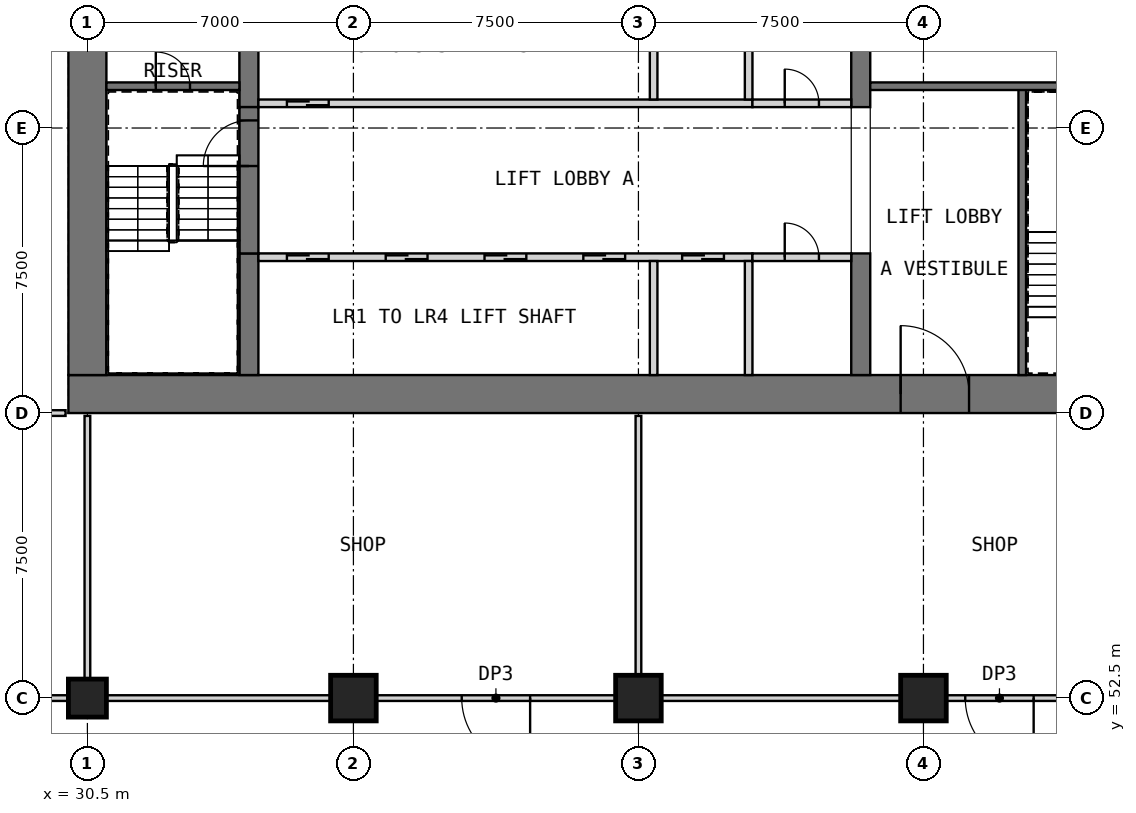
"""IFC4 building model, lengths in metres.
Left out: names, types, materials, properties, quantities, classifications, styles, units other than length and angle.
Written with IfcOpenShell. Run it as: python <this file> out.ifc"""

import sys

from ifc_helpers import new_model, si_unit, direction, frame, frame_2d, origin, origin_2d, place, context, subcontext, project, spatial, rectangle, extrude, element, fill, save


model = new_model("IFC4")
c1 = context("Model", 3, precision=1e-05, world=origin(), true_north=direction((0.0, 1.0)))
c2 = subcontext(c1, "Body", "Model", "MODEL_VIEW")
j1 = project(units=[si_unit("LENGTHUNIT", "METRE"), si_unit("PLANEANGLEUNIT", "RADIAN")], contexts=[c1])
p1 = place(None, origin())
s1 = spatial("IfcSite", under=j1, at=p1, CompositionType="ELEMENT")
p2 = place(p1, origin())
s2 = spatial("IfcBuilding", under=s1, at=p2, CompositionType="ELEMENT")
p3 = place(p2, frame((0.0, 0.0, 13.5)))
s3 = spatial("IfcBuildingStorey", under=s2, at=p3, CompositionType="ELEMENT", Elevation=13.5)
p4 = place(p3, frame((30.5, 52.5, 0.0), z_axis=(0.0, 0.0, 1.0), x_axis=(1.0, 0.0, 0.0)))
e1 = element("IfcColumn", 1, at=p4, inside=s3, PredefinedType="COLUMN", context=c2, shape_type="SweptSolid", body=[
    extrude(rectangle(XDim=1.0, YDim=1.0, at=origin_2d()), origin(), (0.0, 0.0, 1.0), 5.0),
])
for number, where, z_axis, x_axis in (
    (2, (37.5, 52.5, 0.0), (0.0, 0.0, 1.0), (1.0, 0.0, 0.0)),
    (3, (45.0, 52.5, 0.0), (0.0, 0.0, 1.0), (1.0, 0.0, 0.0)),
    (4, (52.5, 52.5, 0.0), (0.0, 0.0, 1.0), (1.0, 0.0, 0.0)),
):
    element("IfcColumn", number, at=place(p3, frame(where, z_axis=z_axis, x_axis=x_axis)), inside=s3, PredefinedType="COLUMN", context=c2, shape_type="SweptSolid", body=[
        extrude(rectangle(XDim=1.2, YDim=1.2, at=origin_2d()), origin(), (0.0, 0.0, 1.0), 5.0),
    ])
p5 = place(p3, frame((30.0, 60.5, 0.0), z_axis=(0.0, 0.0, 1.0), x_axis=(1.0, 0.0, 0.0)))
e5 = element("IfcWall", 5, at=p5, inside=s3, PredefinedType="SHEAR", context=c2, shape_type="SweptSolid", body=[
    extrude(rectangle(XDim=30.0, YDim=1.0, at=frame_2d((15.0, 0.0))), origin(), (0.0, 0.0, 1.0), 5.0),
])
p6 = place(p5, frame((21.9, 0.0, 0.0)))
e6 = element("IfcOpeningElement", 6, at=p6, cuts=e5, PredefinedType="OPENING", context=c2, shape_type="SweptSolid", body=[
    extrude(rectangle(XDim=1.8, YDim=2.1, at=frame_2d((0.9, 1.05))), frame((0.0, 0.51, 0.0), z_axis=(0.0, -1.0, 0.0), x_axis=(1.0, 0.0, 0.0)), (0.0, 0.0, 1.0), 1.02),
])
p7 = place(p5, frame((26.5, 0.0, 0.0)))
e7 = element("IfcOpeningElement", 7, at=p7, cuts=e5, PredefinedType="OPENING", context=c2, shape_type="SweptSolid", body=[
    extrude(rectangle(XDim=1.2, YDim=2.1, at=frame_2d((0.6, 1.05))), frame((0.0, 0.51, 0.0), z_axis=(0.0, -1.0, 0.0), x_axis=(1.0, 0.0, 0.0)), (0.0, 0.0, 1.0), 1.02),
])
p8 = place(p3, frame((30.5, 61.0, 0.0), z_axis=(0.0, 0.0, 1.0), x_axis=(0.0, 1.0, 0.0)))
e8 = element("IfcWall", 8, at=p8, inside=s3, PredefinedType="SHEAR", context=c2, shape_type="SweptSolid", body=[
    extrude(rectangle(XDim=20.5, YDim=1.0, at=frame_2d((10.25, 0.0))), origin(), (0.0, 0.0, 1.0), 5.0),
])
p9 = place(p3, frame((34.75, 61.0, 0.0), z_axis=(0.0, 0.0, 1.0), x_axis=(0.0, 1.0, 0.0)))
e9 = element("IfcWall", 9, at=p9, inside=s3, PredefinedType="SHEAR", context=c2, shape_type="SweptSolid", body=[
    extrude(rectangle(XDim=3.2, YDim=0.5, at=frame_2d((1.6, 0.0))), origin(), (0.0, 0.0, 1.0), 5.0),
])
p10 = place(p3, frame((34.75, 68.05, 0.0), z_axis=(0.0, 0.0, 1.0), x_axis=(0.0, 1.0, 0.0)))
e10 = element("IfcWall", 10, at=p10, inside=s3, PredefinedType="SHEAR", context=c2, shape_type="SweptSolid", body=[
    extrude(rectangle(XDim=6.4, YDim=0.5, at=frame_2d((3.2, 0.0))), origin(), (0.0, 0.0, 1.0), 5.0),
])
p11 = place(p3, frame((50.85, 61.0, 0.0), z_axis=(0.0, 0.0, 1.0), x_axis=(0.0, 1.0, 0.0)))
e11 = element("IfcWall", 11, at=p11, inside=s3, PredefinedType="SHEAR", context=c2, shape_type="SweptSolid", body=[
    extrude(rectangle(XDim=3.2, YDim=0.5, at=frame_2d((1.6, 0.0))), origin(), (0.0, 0.0, 1.0), 5.0),
])
p12 = place(p3, frame((50.85, 68.05, 0.0), z_axis=(0.0, 0.0, 1.0), x_axis=(0.0, 1.0, 0.0)))
e12 = element("IfcWall", 12, at=p12, inside=s3, PredefinedType="SHEAR", context=c2, shape_type="SweptSolid", body=[
    extrude(rectangle(XDim=6.4, YDim=0.5, at=frame_2d((3.2, 0.0))), origin(), (0.0, 0.0, 1.0), 5.0),
])
p13 = place(p3, frame((35.0, 64.1, 0.0), z_axis=(0.0, 0.0, 1.0), x_axis=(1.0, 0.0, 0.0)))
e13 = element("IfcWall", 13, at=p13, inside=s3, PredefinedType="SOLIDWALL", context=c2, shape_type="SweptSolid", body=[
    extrude(rectangle(XDim=13.0, YDim=0.2, at=frame_2d((6.5, 0.0))), origin(), (0.0, 0.0, 1.0), 5.0),
])
p14 = place(p13, frame((0.75, 0.0, 0.0)))
e14 = element("IfcOpeningElement", 14, at=p14, cuts=e13, PredefinedType="OPENING", context=c2, shape_type="SweptSolid", body=[
    extrude(rectangle(XDim=1.1, YDim=2.1, at=frame_2d((0.55, 1.05))), frame((0.0, 0.11, 0.0), z_axis=(0.0, -1.0, 0.0), x_axis=(1.0, 0.0, 0.0)), (0.0, 0.0, 1.0), 0.22),
])
p15 = place(p13, frame((3.35, 0.0, 0.0)))
e15 = element("IfcOpeningElement", 15, at=p15, cuts=e13, PredefinedType="OPENING", context=c2, shape_type="SweptSolid", body=[
    extrude(rectangle(XDim=1.1, YDim=2.1, at=frame_2d((0.55, 1.05))), frame((0.0, 0.11, 0.0), z_axis=(0.0, -1.0, 0.0), x_axis=(1.0, 0.0, 0.0)), (0.0, 0.0, 1.0), 0.22),
])
p16 = place(p13, frame((5.95, 0.0, 0.0)))
e16 = element("IfcOpeningElement", 16, at=p16, cuts=e13, PredefinedType="OPENING", context=c2, shape_type="SweptSolid", body=[
    extrude(rectangle(XDim=1.1, YDim=2.1, at=frame_2d((0.55, 1.05))), frame((0.0, 0.11, 0.0), z_axis=(0.0, -1.0, 0.0), x_axis=(1.0, 0.0, 0.0)), (0.0, 0.0, 1.0), 0.22),
])
p17 = place(p13, frame((8.55, 0.0, 0.0)))
e17 = element("IfcOpeningElement", 17, at=p17, cuts=e13, PredefinedType="OPENING", context=c2, shape_type="SweptSolid", body=[
    extrude(rectangle(XDim=1.1, YDim=2.1, at=frame_2d((0.55, 1.05))), frame((0.0, 0.11, 0.0), z_axis=(0.0, -1.0, 0.0), x_axis=(1.0, 0.0, 0.0)), (0.0, 0.0, 1.0), 0.22),
])
p18 = place(p13, frame((11.15, 0.0, 0.0)))
e18 = element("IfcOpeningElement", 18, at=p18, cuts=e13, PredefinedType="OPENING", context=c2, shape_type="SweptSolid", body=[
    extrude(rectangle(XDim=1.1, YDim=2.1, at=frame_2d((0.55, 1.05))), frame((0.0, 0.11, 0.0), z_axis=(0.0, -1.0, 0.0), x_axis=(1.0, 0.0, 0.0)), (0.0, 0.0, 1.0), 0.22),
])
for number, where, z_axis, x_axis in (
    (19, (45.4, 61.0, 0.0), (0.0, 0.0, 1.0), (0.0, 1.0, 0.0)),
    (20, (47.9, 61.0, 0.0), (0.0, 0.0, 1.0), (0.0, 1.0, 0.0)),
):
    element("IfcWall", number, at=place(p3, frame(where, z_axis=z_axis, x_axis=x_axis)), inside=s3, PredefinedType="SOLIDWALL", context=c2, shape_type="SweptSolid", body=[
        extrude(rectangle(XDim=3.0, YDim=0.2, at=frame_2d((1.5, 0.0))), origin(), (0.0, 0.0, 1.0), 5.0),
    ])
p19 = place(p3, frame((48.0, 64.1, 0.0), z_axis=(0.0, 0.0, 1.0), x_axis=(1.0, 0.0, 0.0)))
e21 = element("IfcWall", 21, at=p19, inside=s3, PredefinedType="PARTITIONING", context=c2, shape_type="SweptSolid", body=[
    extrude(rectangle(XDim=2.6, YDim=0.2, at=frame_2d((1.3, 0.0))), origin(), (0.0, 0.0, 1.0), 4.7),
])
p20 = place(p19, frame((0.85, 0.0, 0.0)))
e22 = element("IfcOpeningElement", 22, at=p20, cuts=e21, PredefinedType="OPENING", context=c2, shape_type="SweptSolid", body=[
    extrude(rectangle(XDim=0.9, YDim=2.1, at=frame_2d((0.45, 1.05))), frame((0.0, 0.11, 0.0), z_axis=(0.0, -1.0, 0.0), x_axis=(1.0, 0.0, 0.0)), (0.0, 0.0, 1.0), 0.22),
])
p21 = place(p3, frame((35.0, 68.15, 0.0), z_axis=(0.0, 0.0, 1.0), x_axis=(1.0, 0.0, 0.0)))
e23 = element("IfcWall", 23, at=p21, inside=s3, PredefinedType="SOLIDWALL", context=c2, shape_type="SweptSolid", body=[
    extrude(rectangle(XDim=13.0, YDim=0.2, at=frame_2d((6.5, 0.0))), origin(), (0.0, 0.0, 1.0), 5.0),
])
p22 = place(p21, frame((0.75, 0.0, 0.0)))
e24 = element("IfcOpeningElement", 24, at=p22, cuts=e23, PredefinedType="OPENING", context=c2, shape_type="SweptSolid", body=[
    extrude(rectangle(XDim=1.1, YDim=2.1, at=frame_2d((0.55, 1.05))), frame((0.0, 0.11, 0.0), z_axis=(0.0, -1.0, 0.0), x_axis=(1.0, 0.0, 0.0)), (0.0, 0.0, 1.0), 0.22),
])
for number, where, z_axis, x_axis in (
    (25, (45.4, 68.25, 0.0), (0.0, 0.0, 1.0), (0.0, 1.0, 0.0)),
    (26, (47.9, 68.25, 0.0), (0.0, 0.0, 1.0), (0.0, 1.0, 0.0)),
):
    element("IfcWall", number, at=place(p3, frame(where, z_axis=z_axis, x_axis=x_axis)), inside=s3, PredefinedType="SOLIDWALL", context=c2, shape_type="SweptSolid", body=[
        extrude(rectangle(XDim=2.75, YDim=0.2, at=frame_2d((1.375, 0.0))), origin(), (0.0, 0.0, 1.0), 5.0),
    ])
p23 = place(p3, frame((48.0, 68.15, 0.0), z_axis=(0.0, 0.0, 1.0), x_axis=(1.0, 0.0, 0.0)))
e27 = element("IfcWall", 27, at=p23, inside=s3, PredefinedType="PARTITIONING", context=c2, shape_type="SweptSolid", body=[
    extrude(rectangle(XDim=2.6, YDim=0.2, at=frame_2d((1.3, 0.0))), origin(), (0.0, 0.0, 1.0), 4.7),
])
p24 = place(p23, frame((0.85, 0.0, 0.0)))
e28 = element("IfcOpeningElement", 28, at=p24, cuts=e27, PredefinedType="OPENING", context=c2, shape_type="SweptSolid", body=[
    extrude(rectangle(XDim=0.9, YDim=2.1, at=frame_2d((0.45, 1.05))), frame((0.0, 0.11, 0.0), z_axis=(0.0, -1.0, 0.0), x_axis=(1.0, 0.0, 0.0)), (0.0, 0.0, 1.0), 0.22),
])
p25 = place(p3, frame((34.75, 64.2, 0.0), z_axis=(0.0, 0.0, 1.0), x_axis=(0.0, 1.0, 0.0)))
e29 = element("IfcWall", 29, at=p25, inside=s3, PredefinedType="SOLIDWALL", context=c2, shape_type="SweptSolid", body=[
    extrude(rectangle(XDim=3.85, YDim=0.5, at=frame_2d((1.925, 0.0))), origin(), (0.0, 0.0, 1.0), 3.8),
])
p26 = place(p25, frame((2.3, 0.0, 0.0)))
e30 = element("IfcOpeningElement", 30, at=p26, cuts=e29, PredefinedType="OPENING", context=c2, shape_type="SweptSolid", body=[
    extrude(rectangle(XDim=1.2, YDim=2.1, at=frame_2d((0.6, 1.05))), frame((0.0, 0.26, 0.0), z_axis=(0.0, -1.0, 0.0), x_axis=(1.0, 0.0, 0.0)), (0.0, 0.0, 1.0), 0.52),
])
p27 = place(p3, frame((31.0, 68.6, 0.0), z_axis=(0.0, 0.0, 1.0), x_axis=(1.0, 0.0, 0.0)))
e31 = element("IfcWall", 31, at=p27, inside=s3, PredefinedType="SOLIDWALL", context=c2, shape_type="SweptSolid", body=[
    extrude(rectangle(XDim=3.5, YDim=0.2, at=frame_2d((1.75, 0.0))), origin(), (0.0, 0.0, 1.0), 4.7),
])
p28 = place(p27, frame((1.3, 0.0, 0.0)))
e32 = element("IfcOpeningElement", 32, at=p28, cuts=e31, PredefinedType="OPENING", context=c2, shape_type="SweptSolid", body=[
    extrude(rectangle(XDim=0.9, YDim=2.1, at=frame_2d((0.45, 1.05))), frame((0.0, 0.11, 0.0), z_axis=(0.0, -1.0, 0.0), x_axis=(1.0, 0.0, 0.0)), (0.0, 0.0, 1.0), 0.22),
])
p29 = place(p3, frame((55.1, 61.0, 0.0), z_axis=(0.0, 0.0, 1.0), x_axis=(0.0, 1.0, 0.0)))
e33 = element("IfcWall", 33, at=p29, inside=s3, PredefinedType="SOLIDWALL", context=c2, shape_type="SweptSolid", body=[
    extrude(rectangle(XDim=7.6, YDim=0.2, at=frame_2d((3.8, 0.0))), origin(), (0.0, 0.0, 1.0), 4.7),
])
p30 = place(p3, frame((51.1, 68.6, 0.0), z_axis=(0.0, 0.0, 1.0), x_axis=(1.0, 0.0, 0.0)))
e34 = element("IfcWall", 34, at=p30, inside=s3, PredefinedType="SOLIDWALL", context=c2, shape_type="SweptSolid", body=[
    extrude(rectangle(XDim=7.9, YDim=0.2, at=frame_2d((3.95, 0.0))), origin(), (0.0, 0.0, 1.0), 4.7),
])
p31 = place(p3, frame((23.6, 52.5, 0.0), z_axis=(0.0, 0.0, 1.0), x_axis=(1.0, 0.0, 0.0)))
e35 = element("IfcWall", 35, at=p31, inside=s3, PredefinedType="PARTITIONING", context=c2, shape_type="SweptSolid", body=[
    extrude(rectangle(XDim=6.4, YDim=0.15, at=frame_2d((3.2, 0.0))), origin(), (0.0, 0.0, 1.0), 4.7),
])
p32 = place(p3, frame((31.0, 52.5, 0.0), z_axis=(0.0, 0.0, 1.0), x_axis=(1.0, 0.0, 0.0)))
e36 = element("IfcWall", 36, at=p32, inside=s3, PredefinedType="PARTITIONING", context=c2, shape_type="SweptSolid", body=[
    extrude(rectangle(XDim=5.9, YDim=0.15, at=frame_2d((2.95, 0.0))), origin(), (0.0, 0.0, 1.0), 4.7),
])
p33 = place(p3, frame((44.4, 52.5, 0.0), z_axis=(0.0, 0.0, 1.0), x_axis=(-1.0, 0.0, 0.0)))
e37 = element("IfcWall", 37, at=p33, inside=s3, PredefinedType="PARTITIONING", context=c2, shape_type="SweptSolid", body=[
    extrude(rectangle(XDim=6.3, YDim=0.15, at=frame_2d((3.15, 0.0))), origin(), (0.0, 0.0, 1.0), 4.7),
])
p34 = place(p33, frame((2.25, 0.0, 0.0)))
e38 = element("IfcOpeningElement", 38, at=p34, cuts=e37, PredefinedType="OPENING", context=c2, shape_type="SweptSolid", body=[
    extrude(rectangle(XDim=1.8, YDim=2.4, at=frame_2d((0.9, 1.2))), frame((0.0, 0.085, 0.0), z_axis=(0.0, -1.0, 0.0), x_axis=(1.0, 0.0, 0.0)), (0.0, 0.0, 1.0), 0.17),
])
p35 = place(p3, frame((45.6, 52.5, 0.0), z_axis=(0.0, 0.0, 1.0), x_axis=(1.0, 0.0, 0.0)))
e39 = element("IfcWall", 39, at=p35, inside=s3, PredefinedType="PARTITIONING", context=c2, shape_type="SweptSolid", body=[
    extrude(rectangle(XDim=6.3, YDim=0.15, at=frame_2d((3.15, 0.0))), origin(), (0.0, 0.0, 1.0), 4.7),
])
p36 = place(p3, frame((59.4, 52.5, 0.0), z_axis=(0.0, 0.0, 1.0), x_axis=(-1.0, 0.0, 0.0)))
e40 = element("IfcWall", 40, at=p36, inside=s3, PredefinedType="PARTITIONING", context=c2, shape_type="SweptSolid", body=[
    extrude(rectangle(XDim=6.3, YDim=0.15, at=frame_2d((3.15, 0.0))), origin(), (0.0, 0.0, 1.0), 4.7),
])
p37 = place(p36, frame((4.0, 0.0, 0.0)))
e41 = element("IfcOpeningElement", 41, at=p37, cuts=e40, PredefinedType="OPENING", context=c2, shape_type="SweptSolid", body=[
    extrude(rectangle(XDim=1.8, YDim=2.4, at=frame_2d((0.9, 1.2))), frame((0.0, 0.085, 0.0), z_axis=(0.0, -1.0, 0.0), x_axis=(1.0, 0.0, 0.0)), (0.0, 0.0, 1.0), 0.17),
])
p38 = place(p3, frame((23.6, 60.0, 0.0), z_axis=(0.0, 0.0, 1.0), x_axis=(1.0, 0.0, 0.0)))
e42 = element("IfcWall", 42, at=p38, inside=s3, PredefinedType="PARTITIONING", context=c2, shape_type="SweptSolid", body=[
    extrude(rectangle(XDim=6.325, YDim=0.15, at=frame_2d((3.163, 0.0))), origin(), (0.0, 0.0, 1.0), 4.7),
])
p39 = place(p3, frame((45.0, 53.1, 0.0), z_axis=(0.0, 0.0, 1.0), x_axis=(0.0, 1.0, 0.0)))
e43 = element("IfcWall", 43, at=p39, inside=s3, PredefinedType="PARTITIONING", context=c2, shape_type="SweptSolid", body=[
    extrude(rectangle(XDim=6.825, YDim=0.15, at=frame_2d((3.413, 0.0))), origin(), (0.0, 0.0, 1.0), 4.7),
])
p40 = place(p3, frame((30.5, 53.0, 0.0), z_axis=(0.0, 0.0, 1.0), x_axis=(0.0, 1.0, 0.0)))
e44 = element("IfcWall", 44, at=p40, inside=s3, PredefinedType="PARTITIONING", context=c2, shape_type="SweptSolid", body=[
    extrude(rectangle(XDim=6.925, YDim=0.15, at=frame_2d((3.462, 0.0))), origin(), (0.0, 0.0, 1.0), 4.7),
])
p41 = place(p14, origin())
e45 = element("IfcDoor", 45, at=p41, inside=s3, OperationType="DOUBLE_DOOR_SLIDING", PredefinedType="DOOR", context=c2, shape_type="SweptSolid", body=[
    extrude(rectangle(XDim=1.1, YDim=2.1, at=frame_2d((0.55, 1.05))), frame((0.0, 0.025, 0.0), z_axis=(0.0, -1.0, 0.0), x_axis=(1.0, 0.0, 0.0)), (0.0, 0.0, 1.0), 0.05),
])
fill(e14, e45)
p42 = place(p15, origin())
e46 = element("IfcDoor", 46, at=p42, inside=s3, OperationType="DOUBLE_DOOR_SLIDING", PredefinedType="DOOR", context=c2, shape_type="SweptSolid", body=[
    extrude(rectangle(XDim=1.1, YDim=2.1, at=frame_2d((0.55, 1.05))), frame((0.0, 0.025, 0.0), z_axis=(0.0, -1.0, 0.0), x_axis=(1.0, 0.0, 0.0)), (0.0, 0.0, 1.0), 0.05),
])
fill(e15, e46)
p43 = place(p16, origin())
e47 = element("IfcDoor", 47, at=p43, inside=s3, OperationType="DOUBLE_DOOR_SLIDING", PredefinedType="DOOR", context=c2, shape_type="SweptSolid", body=[
    extrude(rectangle(XDim=1.1, YDim=2.1, at=frame_2d((0.55, 1.05))), frame((0.0, 0.025, 0.0), z_axis=(0.0, -1.0, 0.0), x_axis=(1.0, 0.0, 0.0)), (0.0, 0.0, 1.0), 0.05),
])
fill(e16, e47)
p44 = place(p17, origin())
e48 = element("IfcDoor", 48, at=p44, inside=s3, OperationType="DOUBLE_DOOR_SLIDING", PredefinedType="DOOR", context=c2, shape_type="SweptSolid", body=[
    extrude(rectangle(XDim=1.1, YDim=2.1, at=frame_2d((0.55, 1.05))), frame((0.0, 0.025, 0.0), z_axis=(0.0, -1.0, 0.0), x_axis=(1.0, 0.0, 0.0)), (0.0, 0.0, 1.0), 0.05),
])
fill(e17, e48)
p45 = place(p18, origin())
e49 = element("IfcDoor", 49, at=p45, inside=s3, OperationType="DOUBLE_DOOR_SLIDING", PredefinedType="DOOR", context=c2, shape_type="SweptSolid", body=[
    extrude(rectangle(XDim=1.1, YDim=2.1, at=frame_2d((0.55, 1.05))), frame((0.0, 0.025, 0.0), z_axis=(0.0, -1.0, 0.0), x_axis=(1.0, 0.0, 0.0)), (0.0, 0.0, 1.0), 0.05),
])
fill(e18, e49)
p46 = place(p20, origin())
e50 = element("IfcDoor", 50, at=p46, inside=s3, OperationType="SINGLE_SWING_RIGHT", PredefinedType="DOOR", context=c2, shape_type="SweptSolid", body=[
    extrude(rectangle(XDim=0.9, YDim=2.1, at=frame_2d((0.45, 1.05))), frame((0.0, 0.025, 0.0), z_axis=(0.0, -1.0, 0.0), x_axis=(1.0, 0.0, 0.0)), (0.0, 0.0, 1.0), 0.05),
])
fill(e22, e50)
p47 = place(p22, origin())
e51 = element("IfcDoor", 51, at=p47, inside=s3, OperationType="DOUBLE_DOOR_SLIDING", PredefinedType="DOOR", context=c2, shape_type="SweptSolid", body=[
    extrude(rectangle(XDim=1.1, YDim=2.1, at=frame_2d((0.55, 1.05))), frame((0.0, 0.025, 0.0), z_axis=(0.0, -1.0, 0.0), x_axis=(1.0, 0.0, 0.0)), (0.0, 0.0, 1.0), 0.05),
])
fill(e24, e51)
p48 = place(p24, origin())
e52 = element("IfcDoor", 52, at=p48, inside=s3, OperationType="SINGLE_SWING_RIGHT", PredefinedType="DOOR", context=c2, shape_type="SweptSolid", body=[
    extrude(rectangle(XDim=0.9, YDim=2.1, at=frame_2d((0.45, 1.05))), frame((0.0, 0.025, 0.0), z_axis=(0.0, -1.0, 0.0), x_axis=(1.0, 0.0, 0.0)), (0.0, 0.0, 1.0), 0.05),
])
fill(e28, e52)
p49 = place(p6, origin())
e53 = element("IfcDoor", 53, at=p49, inside=s3, OperationType="DOUBLE_DOOR_SINGLE_SWING", PredefinedType="DOOR", context=c2, shape_type="SweptSolid", body=[
    extrude(rectangle(XDim=1.8, YDim=2.1, at=frame_2d((0.9, 1.05))), frame((0.0, 0.025, 0.0), z_axis=(0.0, -1.0, 0.0), x_axis=(1.0, 0.0, 0.0)), (0.0, 0.0, 1.0), 0.05),
])
fill(e6, e53)
p50 = place(p26, origin())
e54 = element("IfcDoor", 54, at=p50, inside=s3, OperationType="SINGLE_SWING_LEFT", PredefinedType="DOOR", context=c2, shape_type="SweptSolid", body=[
    extrude(rectangle(XDim=1.2, YDim=2.1, at=frame_2d((0.6, 1.05))), frame((0.0, 0.025, 0.0), z_axis=(0.0, -1.0, 0.0), x_axis=(1.0, 0.0, 0.0)), (0.0, 0.0, 1.0), 0.05),
])
fill(e30, e54)
p51 = place(p28, origin())
e55 = element("IfcDoor", 55, at=p51, inside=s3, OperationType="SINGLE_SWING_LEFT", PredefinedType="DOOR", context=c2, shape_type="SweptSolid", body=[
    extrude(rectangle(XDim=0.9, YDim=2.1, at=frame_2d((0.45, 1.05))), frame((0.0, 0.025, 0.0), z_axis=(0.0, -1.0, 0.0), x_axis=(1.0, 0.0, 0.0)), (0.0, 0.0, 1.0), 0.05),
])
fill(e32, e55)
p52 = place(p34, origin())
e56 = element("IfcDoor", 56, at=p52, inside=s3, OperationType="SINGLE_SWING_LEFT", PredefinedType="DOOR", context=c2, shape_type="SweptSolid", body=[
    extrude(rectangle(XDim=1.8, YDim=2.4, at=frame_2d((0.9, 1.2))), frame((0.0, 0.025, 0.0), z_axis=(0.0, -1.0, 0.0), x_axis=(1.0, 0.0, 0.0)), (0.0, 0.0, 1.0), 0.05),
])
fill(e38, e56)
p53 = place(p37, origin())
e57 = element("IfcDoor", 57, at=p53, inside=s3, OperationType="SINGLE_SWING_LEFT", PredefinedType="DOOR", context=c2, shape_type="SweptSolid", body=[
    extrude(rectangle(XDim=1.8, YDim=2.4, at=frame_2d((0.9, 1.2))), frame((0.0, 0.025, 0.0), z_axis=(0.0, -1.0, 0.0), x_axis=(1.0, 0.0, 0.0)), (0.0, 0.0, 1.0), 0.05),
])
fill(e41, e57)
save(model, sys.argv[1])
